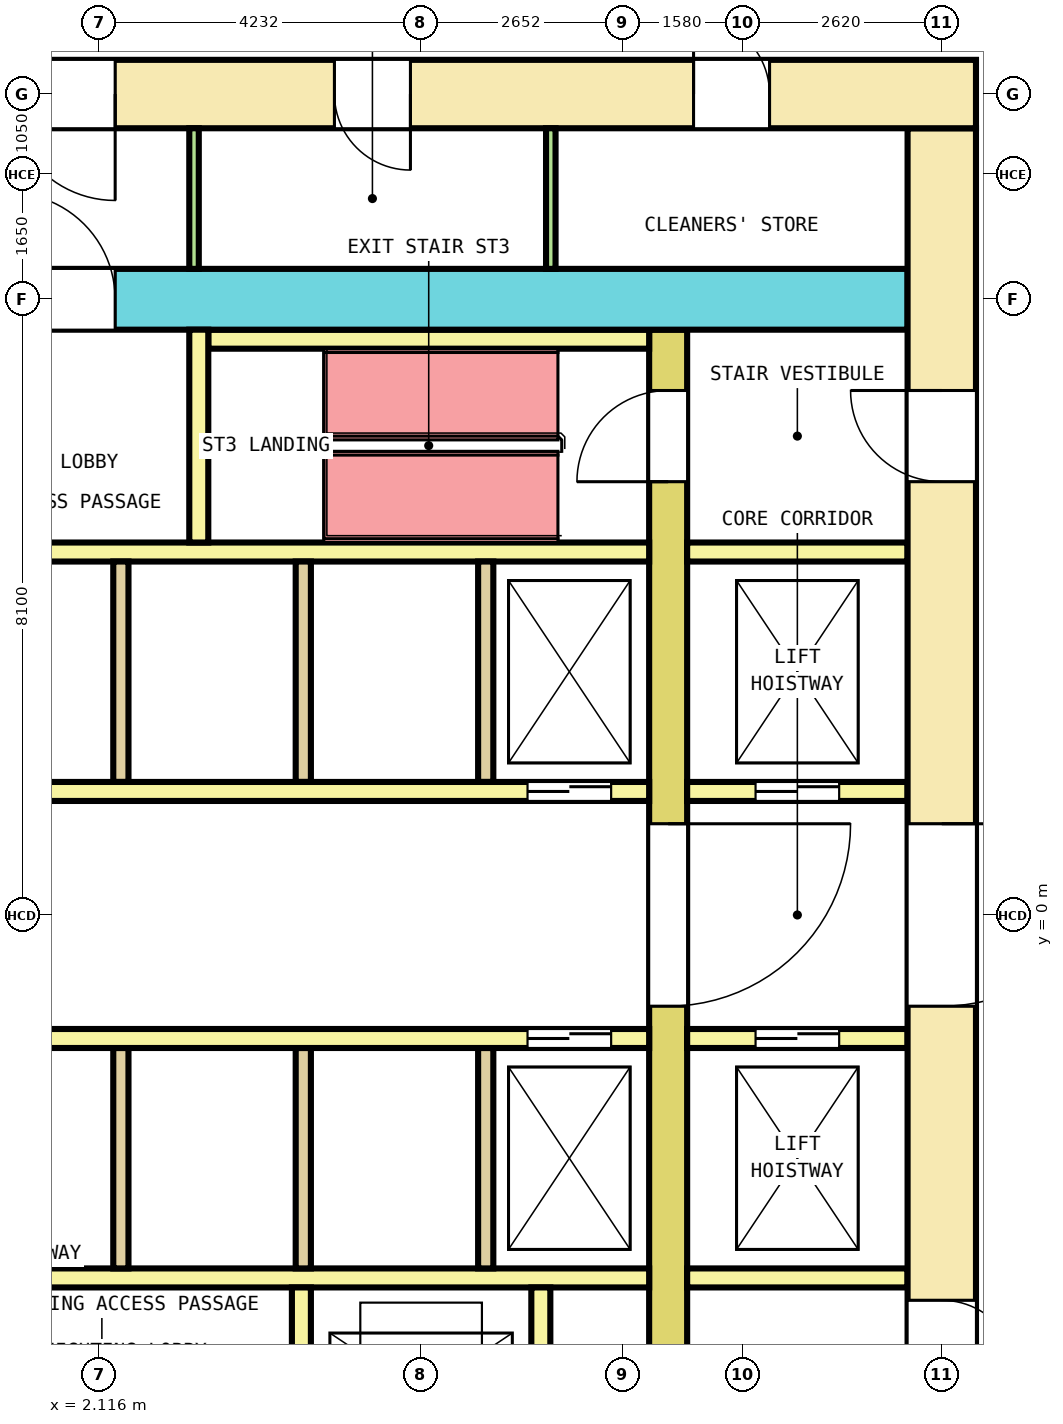
"""IFC4 building model, lengths in metres.
Left out: names, types, materials, properties, quantities, classifications, styles, units other than length and angle.
Written with IfcOpenShell. Run it as: python <this file> out.ifc"""

import sys

from ifc_helpers import new_model, si_unit, direction, frame, frame_2d, origin, place, context, subcontext, project, spatial, rectangle, extrude, element, fill, save


model = new_model("IFC4")
c1 = context("Model", 3, precision=1e-05, world=origin(), true_north=direction((0.0, 1.0)))
c2 = subcontext(c1, "Body", "Model", "MODEL_VIEW")
j1 = project(units=[si_unit("LENGTHUNIT", "METRE"), si_unit("PLANEANGLEUNIT", "RADIAN")], contexts=[c1])
p1 = place(None, origin())
s1 = spatial("IfcSite", under=j1, at=p1, CompositionType="ELEMENT")
p2 = place(p1, origin())
s2 = spatial("IfcBuilding", under=s1, at=p2, CompositionType="ELEMENT")
p3 = place(p2, frame((0.0, 0.0, 32.2)))
s3 = spatial("IfcBuildingStorey", under=s2, at=p3, CompositionType="ELEMENT", Elevation=32.2)
p4 = place(p3, frame((-13.65, 10.8, 0.0), z_axis=(0.0, 0.0, 1.0), x_axis=(1.0, 0.0, 0.0)))
e1 = element("IfcWall", 1, at=p4, inside=s3, PredefinedType="SHEAR", context=c2, shape_type="SweptSolid", body=[
    extrude(rectangle(XDim=27.3, YDim=0.9, at=frame_2d((13.65, 0.0))), origin(), (0.0, 0.0, 1.0), 4.1),
])
p5 = place(p4, frame((2.4, 0.0, 0.0)))
e2 = element("IfcOpeningElement", 2, at=p5, cuts=e1, PredefinedType="OPENING", context=c2, shape_type="SweptSolid", body=[
    extrude(rectangle(XDim=1.0, YDim=2.1, at=frame_2d((0.5, 1.05))), frame((0.0, 0.46, 0.0), z_axis=(0.0, -1.0, 0.0), x_axis=(1.0, 0.0, 0.0)), (0.0, 0.0, 1.0), 0.92),
])
p6 = place(p4, frame((6.494, 0.0, 0.0)))
e3 = element("IfcOpeningElement", 3, at=p6, cuts=e1, PredefinedType="OPENING", context=c2, shape_type="SweptSolid", body=[
    extrude(rectangle(XDim=1.0, YDim=2.1, at=frame_2d((0.5, 1.05))), frame((0.0, 0.46, 0.0), z_axis=(0.0, -1.0, 0.0), x_axis=(1.0, 0.0, 0.0)), (0.0, 0.0, 1.0), 0.92),
])
p7 = place(p4, frame((10.556, 0.0, 0.0)))
e4 = element("IfcOpeningElement", 4, at=p7, cuts=e1, PredefinedType="OPENING", context=c2, shape_type="SweptSolid", body=[
    extrude(rectangle(XDim=1.0, YDim=2.1, at=frame_2d((0.5, 1.05))), frame((0.0, 0.46, 0.0), z_axis=(0.0, -1.0, 0.0), x_axis=(1.0, 0.0, 0.0)), (0.0, 0.0, 1.0), 0.92),
])
p8 = place(p4, frame((18.859, 0.0, 0.0)))
e5 = element("IfcOpeningElement", 5, at=p8, cuts=e1, PredefinedType="OPENING", context=c2, shape_type="SweptSolid", body=[
    extrude(rectangle(XDim=1.0, YDim=2.1, at=frame_2d((0.5, 1.05))), frame((0.0, 0.46, 0.0), z_axis=(0.0, -1.0, 0.0), x_axis=(1.0, 0.0, 0.0)), (0.0, 0.0, 1.0), 0.92),
])
p9 = place(p4, frame((23.584, 0.0, 0.0)))
e6 = element("IfcOpeningElement", 6, at=p9, cuts=e1, PredefinedType="OPENING", context=c2, shape_type="SweptSolid", body=[
    extrude(rectangle(XDim=1.0, YDim=2.1, at=frame_2d((0.5, 1.05))), frame((0.0, 0.46, 0.0), z_axis=(0.0, -1.0, 0.0), x_axis=(1.0, 0.0, 0.0)), (0.0, 0.0, 1.0), 0.92),
])
p10 = place(p4, frame((14.575, 0.0, 0.0)))
e7 = element("IfcOpeningElement", 7, at=p10, cuts=e1, PredefinedType="OPENING", context=c2, shape_type="SweptSolid", body=[
    extrude(rectangle(XDim=1.4, YDim=2.1, at=frame_2d((0.7, 1.05))), frame((0.0, 0.46, 0.0), z_axis=(0.0, -1.0, 0.0), x_axis=(1.0, 0.0, 0.0)), (0.0, 0.0, 1.0), 0.92),
])
p11 = place(p3, frame((13.2, -10.35, 0.0), z_axis=(0.0, 0.0, 1.0), x_axis=(0.0, 1.0, 0.0)))
e8 = element("IfcWall", 8, at=p11, inside=s3, PredefinedType="SHEAR", context=c2, shape_type="SweptSolid", body=[
    extrude(rectangle(XDim=20.7, YDim=0.9, at=frame_2d((10.35, 0.0))), origin(), (0.0, 0.0, 1.0), 4.1),
])
p12 = place(p11, frame((9.15, 0.0, 0.0)))
e9 = element("IfcOpeningElement", 9, at=p12, cuts=e8, PredefinedType="OPENING", context=c2, shape_type="SweptSolid", body=[
    extrude(rectangle(XDim=2.4, YDim=2.1, at=frame_2d((1.2, 1.05))), frame((0.0, 0.46, 0.0), z_axis=(0.0, -1.0, 0.0), x_axis=(1.0, 0.0, 0.0)), (0.0, 0.0, 1.0), 0.92),
])
p13 = place(p11, frame((16.05, 0.0, 0.0)))
e10 = element("IfcOpeningElement", 10, at=p13, cuts=e8, PredefinedType="OPENING", context=c2, shape_type="SweptSolid", body=[
    extrude(rectangle(XDim=1.2, YDim=2.1, at=frame_2d((0.6, 1.05))), frame((0.0, 0.46, 0.0), z_axis=(0.0, -1.0, 0.0), x_axis=(1.0, 0.0, 0.0)), (0.0, 0.0, 1.0), 0.92),
])
p14 = place(p11, frame((2.819, 0.0, 0.0)))
e11 = element("IfcOpeningElement", 11, at=p14, cuts=e8, PredefinedType="OPENING", context=c2, shape_type="SweptSolid", body=[
    extrude(rectangle(XDim=1.0, YDim=2.1, at=frame_2d((0.5, 1.05))), frame((0.0, 0.46, 0.0), z_axis=(0.0, -1.0, 0.0), x_axis=(1.0, 0.0, 0.0)), (0.0, 0.0, 1.0), 0.92),
])
p15 = place(p11, frame((4.281, 0.0, 0.0)))
e12 = element("IfcOpeningElement", 12, at=p15, cuts=e8, PredefinedType="OPENING", context=c2, shape_type="SweptSolid", body=[
    extrude(rectangle(XDim=1.0, YDim=2.1, at=frame_2d((0.5, 1.05))), frame((0.0, 0.46, 0.0), z_axis=(0.0, -1.0, 0.0), x_axis=(1.0, 0.0, 0.0)), (0.0, 0.0, 1.0), 0.92),
])
p16 = place(p3, frame((-12.75, 8.1, 0.0), z_axis=(0.0, 0.0, 1.0), x_axis=(1.0, 0.0, 0.0)))
e13 = element("IfcWall", 13, at=p16, inside=s3, PredefinedType="SHEAR", context=c2, shape_type="SweptSolid", body=[
    extrude(rectangle(XDim=25.5, YDim=0.8, at=frame_2d((12.75, 0.0))), origin(), (0.0, 0.0, 1.0), 4.1),
])
p17 = place(p16, frame((13.675, 0.0, 0.0)))
e14 = element("IfcOpeningElement", 14, at=p17, cuts=e13, PredefinedType="OPENING", context=c2, shape_type="SweptSolid", body=[
    extrude(rectangle(XDim=1.4, YDim=2.1, at=frame_2d((0.7, 1.05))), frame((0.0, 0.41, 0.0), z_axis=(0.0, -1.0, 0.0), x_axis=(1.0, 0.0, 0.0)), (0.0, 0.0, 1.0), 0.82),
])
p18 = place(p3, frame((9.6, -7.7, 0.0), z_axis=(0.0, 0.0, 1.0), x_axis=(0.0, 1.0, 0.0)))
e15 = element("IfcWall", 15, at=p18, inside=s3, PredefinedType="SHEAR", context=c2, shape_type="SweptSolid", body=[
    extrude(rectangle(XDim=15.4, YDim=0.5, at=frame_2d((7.7, 0.0))), origin(), (0.0, 0.0, 1.0), 4.1),
])
p19 = place(p18, frame((6.5, 0.0, 0.0)))
e16 = element("IfcOpeningElement", 16, at=p19, cuts=e15, PredefinedType="OPENING", context=c2, shape_type="SweptSolid", body=[
    extrude(rectangle(XDim=2.4, YDim=2.1, at=frame_2d((1.2, 1.05))), frame((0.0, 0.26, 0.0), z_axis=(0.0, -1.0, 0.0), x_axis=(1.0, 0.0, 0.0)), (0.0, 0.0, 1.0), 0.52),
])
p20 = place(p18, frame((13.4, 0.0, 0.0)))
e17 = element("IfcOpeningElement", 17, at=p20, cuts=e15, PredefinedType="OPENING", context=c2, shape_type="SweptSolid", body=[
    extrude(rectangle(XDim=1.2, YDim=2.1, at=frame_2d((0.6, 1.05))), frame((0.0, 0.26, 0.0), z_axis=(0.0, -1.0, 0.0), x_axis=(1.0, 0.0, 0.0)), (0.0, 0.0, 1.0), 0.52),
])
p21 = place(p18, frame((0.9, 0.0, 0.0)))
e18 = element("IfcOpeningElement", 18, at=p21, cuts=e15, PredefinedType="OPENING", context=c2, shape_type="SweptSolid", body=[
    extrude(rectangle(XDim=1.0, YDim=2.1, at=frame_2d((0.5, 1.05))), frame((0.0, 0.26, 0.0), z_axis=(0.0, -1.0, 0.0), x_axis=(1.0, 0.0, 0.0)), (0.0, 0.0, 1.0), 0.52),
])
p22 = place(p3, frame((-9.35, 1.625, 0.0), z_axis=(0.0, 0.0, 1.0), x_axis=(1.0, 0.0, 0.0)))
e19 = element("IfcWall", 19, at=p22, inside=s3, PredefinedType="SOLIDWALL", context=c2, shape_type="SweptSolid", body=[
    extrude(rectangle(XDim=18.7, YDim=0.25, at=frame_2d((9.35, 0.0))), origin(), (0.0, 0.0, 1.0), 4.1),
])
p23 = place(p22, frame((0.5, 0.0, 0.0)))
e20 = element("IfcOpeningElement", 20, at=p23, cuts=e19, PredefinedType="OPENING", context=c2, shape_type="SweptSolid", body=[
    extrude(rectangle(XDim=1.1, YDim=2.1, at=frame_2d((0.55, 1.05))), frame((0.0, 0.135, 0.0), z_axis=(0.0, -1.0, 0.0), x_axis=(1.0, 0.0, 0.0)), (0.0, 0.0, 1.0), 0.27),
])
p24 = place(p22, frame((17.1, 0.0, 0.0)))
e21 = element("IfcOpeningElement", 21, at=p24, cuts=e19, PredefinedType="OPENING", context=c2, shape_type="SweptSolid", body=[
    extrude(rectangle(XDim=1.1, YDim=2.1, at=frame_2d((0.55, 1.05))), frame((0.0, 0.135, 0.0), z_axis=(0.0, -1.0, 0.0), x_axis=(1.0, 0.0, 0.0)), (0.0, 0.0, 1.0), 0.27),
])
p25 = place(p3, frame((9.85, 1.625, 0.0), z_axis=(0.0, 0.0, 1.0), x_axis=(1.0, 0.0, 0.0)))
e22 = element("IfcWall", 22, at=p25, inside=s3, PredefinedType="SOLIDWALL", context=c2, shape_type="SweptSolid", body=[
    extrude(rectangle(XDim=2.9, YDim=0.25, at=frame_2d((1.45, 0.0))), origin(), (0.0, 0.0, 1.0), 4.1),
])
p26 = place(p25, frame((0.9, 0.0, 0.0)))
e23 = element("IfcOpeningElement", 23, at=p26, cuts=e22, PredefinedType="OPENING", context=c2, shape_type="SweptSolid", body=[
    extrude(rectangle(XDim=1.1, YDim=2.1, at=frame_2d((0.55, 1.05))), frame((0.0, 0.135, 0.0), z_axis=(0.0, -1.0, 0.0), x_axis=(1.0, 0.0, 0.0)), (0.0, 0.0, 1.0), 0.27),
])
p27 = place(p3, frame((-9.35, 4.775, 0.0), z_axis=(0.0, 0.0, 1.0), x_axis=(1.0, 0.0, 0.0)))
e24 = element("IfcWall", 24, at=p27, inside=s3, PredefinedType="SOLIDWALL", context=c2, shape_type="SweptSolid", body=[
    extrude(rectangle(XDim=18.7, YDim=0.25, at=frame_2d((9.35, 0.0))), origin(), (0.0, 0.0, 1.0), 4.1),
])
p28 = place(p3, frame((9.85, 4.775, 0.0), z_axis=(0.0, 0.0, 1.0), x_axis=(1.0, 0.0, 0.0)))
e25 = element("IfcWall", 25, at=p28, inside=s3, PredefinedType="SOLIDWALL", context=c2, shape_type="SweptSolid", body=[
    extrude(rectangle(XDim=2.9, YDim=0.25, at=frame_2d((1.45, 0.0))), origin(), (0.0, 0.0, 1.0), 4.1),
])
for number, where, z_axis, x_axis in (
    (26, (2.4, 1.75, 0.0), (0.0, 0.0, 1.0), (0.0, 1.0, 0.0)),
    (27, (4.8, 1.75, 0.0), (0.0, 0.0, 1.0), (0.0, 1.0, 0.0)),
    (28, (7.2, 1.75, 0.0), (0.0, 0.0, 1.0), (0.0, 1.0, 0.0)),
):
    element("IfcWall", number, at=place(p3, frame(where, z_axis=z_axis, x_axis=x_axis)), inside=s3, PredefinedType="SOLIDWALL", context=c2, shape_type="SweptSolid", body=[
        extrude(rectangle(XDim=2.9, YDim=0.2, at=frame_2d((1.45, 0.0))), origin(), (0.0, 0.0, 1.0), 4.1),
    ])
p29 = place(p3, frame((-9.35, -1.625, 0.0), z_axis=(0.0, 0.0, 1.0), x_axis=(1.0, 0.0, 0.0)))
e29 = element("IfcWall", 29, at=p29, inside=s3, PredefinedType="SOLIDWALL", context=c2, shape_type="SweptSolid", body=[
    extrude(rectangle(XDim=18.7, YDim=0.25, at=frame_2d((9.35, 0.0))), origin(), (0.0, 0.0, 1.0), 4.1),
])
p30 = place(p29, frame((0.5, 0.0, 0.0)))
e30 = element("IfcOpeningElement", 30, at=p30, cuts=e29, PredefinedType="OPENING", context=c2, shape_type="SweptSolid", body=[
    extrude(rectangle(XDim=1.1, YDim=2.1, at=frame_2d((0.55, 1.05))), frame((0.0, 0.135, 0.0), z_axis=(0.0, -1.0, 0.0), x_axis=(1.0, 0.0, 0.0)), (0.0, 0.0, 1.0), 0.27),
])
p31 = place(p29, frame((17.1, 0.0, 0.0)))
e31 = element("IfcOpeningElement", 31, at=p31, cuts=e29, PredefinedType="OPENING", context=c2, shape_type="SweptSolid", body=[
    extrude(rectangle(XDim=1.1, YDim=2.1, at=frame_2d((0.55, 1.05))), frame((0.0, 0.135, 0.0), z_axis=(0.0, -1.0, 0.0), x_axis=(1.0, 0.0, 0.0)), (0.0, 0.0, 1.0), 0.27),
])
p32 = place(p3, frame((9.85, -1.625, 0.0), z_axis=(0.0, 0.0, 1.0), x_axis=(1.0, 0.0, 0.0)))
e32 = element("IfcWall", 32, at=p32, inside=s3, PredefinedType="SOLIDWALL", context=c2, shape_type="SweptSolid", body=[
    extrude(rectangle(XDim=2.9, YDim=0.25, at=frame_2d((1.45, 0.0))), origin(), (0.0, 0.0, 1.0), 4.1),
])
p33 = place(p32, frame((0.9, 0.0, 0.0)))
e33 = element("IfcOpeningElement", 33, at=p33, cuts=e32, PredefinedType="OPENING", context=c2, shape_type="SweptSolid", body=[
    extrude(rectangle(XDim=1.1, YDim=2.1, at=frame_2d((0.55, 1.05))), frame((0.0, 0.135, 0.0), z_axis=(0.0, -1.0, 0.0), x_axis=(1.0, 0.0, 0.0)), (0.0, 0.0, 1.0), 0.27),
])
p34 = place(p3, frame((-9.35, -4.775, 0.0), z_axis=(0.0, 0.0, 1.0), x_axis=(1.0, 0.0, 0.0)))
e34 = element("IfcWall", 34, at=p34, inside=s3, PredefinedType="SOLIDWALL", context=c2, shape_type="SweptSolid", body=[
    extrude(rectangle(XDim=18.7, YDim=0.25, at=frame_2d((9.35, 0.0))), origin(), (0.0, 0.0, 1.0), 4.1),
])
p35 = place(p3, frame((9.85, -4.775, 0.0), z_axis=(0.0, 0.0, 1.0), x_axis=(1.0, 0.0, 0.0)))
e35 = element("IfcWall", 35, at=p35, inside=s3, PredefinedType="SOLIDWALL", context=c2, shape_type="SweptSolid", body=[
    extrude(rectangle(XDim=2.9, YDim=0.25, at=frame_2d((1.45, 0.0))), origin(), (0.0, 0.0, 1.0), 4.1),
])
for number, where, z_axis, x_axis in (
    (36, (2.4, -4.65, 0.0), (0.0, 0.0, 1.0), (0.0, 1.0, 0.0)),
    (37, (4.8, -4.65, 0.0), (0.0, 0.0, 1.0), (0.0, 1.0, 0.0)),
    (38, (7.2, -4.65, 0.0), (0.0, 0.0, 1.0), (0.0, 1.0, 0.0)),
):
    element("IfcWall", number, at=place(p3, frame(where, z_axis=z_axis, x_axis=x_axis)), inside=s3, PredefinedType="SOLIDWALL", context=c2, shape_type="SweptSolid", body=[
        extrude(rectangle(XDim=2.9, YDim=0.2, at=frame_2d((1.45, 0.0))), origin(), (0.0, 0.0, 1.0), 4.1),
    ])
p36 = place(p3, frame((3.55, 7.575, 0.0), z_axis=(0.0, 0.0, 1.0), x_axis=(1.0, 0.0, 0.0)))
e39 = element("IfcWall", 39, at=p36, inside=s3, PredefinedType="SOLIDWALL", context=c2, shape_type="SweptSolid", body=[
    extrude(rectangle(XDim=5.8, YDim=0.25, at=frame_2d((2.9, 0.0))), origin(), (0.0, 0.0, 1.0), 4.1),
])
p37 = place(p3, frame((3.425, 4.9, 0.0), z_axis=(0.0, 0.0, 1.0), x_axis=(0.0, 1.0, 0.0)))
e40 = element("IfcWall", 40, at=p37, inside=s3, PredefinedType="SOLIDWALL", context=c2, shape_type="SweptSolid", body=[
    extrude(rectangle(XDim=2.8, YDim=0.25, at=frame_2d((1.4, 0.0))), origin(), (0.0, 0.0, 1.0), 4.1),
])
p38 = place(p3, frame((4.775, -7.7, 0.0), z_axis=(0.0, 0.0, 1.0), x_axis=(0.0, 1.0, 0.0)))
e41 = element("IfcWall", 41, at=p38, inside=s3, PredefinedType="SOLIDWALL", context=c2, shape_type="SweptSolid", body=[
    extrude(rectangle(XDim=2.8, YDim=0.25, at=frame_2d((1.4, 0.0))), origin(), (0.0, 0.0, 1.0), 4.1),
])
p39 = place(p38, frame((0.85, 0.0, 0.0)))
e42 = element("IfcOpeningElement", 42, at=p39, cuts=e41, PredefinedType="OPENING", context=c2, shape_type="SweptSolid", body=[
    extrude(rectangle(XDim=1.1, YDim=2.1, at=frame_2d((0.55, 1.05))), frame((0.0, 0.135, 0.0), z_axis=(0.0, -1.0, 0.0), x_axis=(1.0, 0.0, 0.0)), (0.0, 0.0, 1.0), 0.27),
])
p40 = place(p3, frame((7.925, -7.7, 0.0), z_axis=(0.0, 0.0, 1.0), x_axis=(0.0, 1.0, 0.0)))
e43 = element("IfcWall", 43, at=p40, inside=s3, PredefinedType="SOLIDWALL", context=c2, shape_type="SweptSolid", body=[
    extrude(rectangle(XDim=2.8, YDim=0.25, at=frame_2d((1.4, 0.0))), origin(), (0.0, 0.0, 1.0), 4.1),
])
for number, where, z_axis, x_axis in (
    (44, (3.363, 8.5, 0.0), (0.0, 0.0, 1.0), (0.0, 1.0, 0.0)),
    (45, (8.056, 8.5, 0.0), (0.0, 0.0, 1.0), (0.0, 1.0, 0.0)),
):
    element("IfcWall", number, at=place(p3, frame(where, z_axis=z_axis, x_axis=x_axis)), inside=s3, PredefinedType="PARTITIONING", context=c2, shape_type="SweptSolid", body=[
        extrude(rectangle(XDim=1.85, YDim=0.125, at=frame_2d((0.925, 0.0))), origin(), (0.0, 0.0, 1.0), 4.1),
    ])
p41 = place(p24, origin())
e46 = element("IfcDoor", 46, at=p41, inside=s3, OperationType="DOUBLE_DOOR_SLIDING", PredefinedType="DOOR", context=c2, shape_type="SweptSolid", body=[
    extrude(rectangle(XDim=1.1, YDim=2.1, at=frame_2d((0.55, 1.05))), frame((0.0, 0.075, 0.0), z_axis=(0.0, -1.0, 0.0), x_axis=(1.0, 0.0, 0.0)), (0.0, 0.0, 1.0), 0.15),
])
fill(e21, e46)
p42 = place(p26, origin())
e47 = element("IfcDoor", 47, at=p42, inside=s3, OperationType="DOUBLE_DOOR_SLIDING", PredefinedType="DOOR", context=c2, shape_type="SweptSolid", body=[
    extrude(rectangle(XDim=1.1, YDim=2.1, at=frame_2d((0.55, 1.05))), frame((0.0, 0.075, 0.0), z_axis=(0.0, -1.0, 0.0), x_axis=(1.0, 0.0, 0.0)), (0.0, 0.0, 1.0), 0.15),
])
fill(e23, e47)
p43 = place(p31, origin())
e48 = element("IfcDoor", 48, at=p43, inside=s3, OperationType="DOUBLE_DOOR_SLIDING", PredefinedType="DOOR", context=c2, shape_type="SweptSolid", body=[
    extrude(rectangle(XDim=1.1, YDim=2.1, at=frame_2d((0.55, 1.05))), frame((0.0, 0.075, 0.0), z_axis=(0.0, -1.0, 0.0), x_axis=(1.0, 0.0, 0.0)), (0.0, 0.0, 1.0), 0.15),
])
fill(e31, e48)
p44 = place(p33, origin())
e49 = element("IfcDoor", 49, at=p44, inside=s3, OperationType="DOUBLE_DOOR_SLIDING", PredefinedType="DOOR", context=c2, shape_type="SweptSolid", body=[
    extrude(rectangle(XDim=1.1, YDim=2.1, at=frame_2d((0.55, 1.05))), frame((0.0, 0.075, 0.0), z_axis=(0.0, -1.0, 0.0), x_axis=(1.0, 0.0, 0.0)), (0.0, 0.0, 1.0), 0.15),
])
fill(e33, e49)
p45 = place(p19, origin())
e50 = element("IfcDoor", 50, at=p45, inside=s3, OperationType="DOUBLE_DOOR_SINGLE_SWING", PredefinedType="DOOR", context=c2, shape_type="SweptSolid", body=[
    extrude(rectangle(XDim=2.4, YDim=2.1, at=frame_2d((1.2, 1.05))), frame((0.0, 0.2, 0.0), z_axis=(0.0, -1.0, 0.0), x_axis=(1.0, 0.0, 0.0)), (0.0, 0.0, 1.0), 0.4),
])
fill(e16, e50)
p46 = place(p12, origin())
e51 = element("IfcDoor", 51, at=p46, inside=s3, OperationType="DOUBLE_DOOR_SINGLE_SWING", PredefinedType="DOOR", context=c2, shape_type="SweptSolid", body=[
    extrude(rectangle(XDim=2.4, YDim=2.1, at=frame_2d((1.2, 1.05))), frame((0.0, 0.3, 0.0), z_axis=(0.0, -1.0, 0.0), x_axis=(1.0, 0.0, 0.0)), (0.0, 0.0, 1.0), 0.6),
])
fill(e9, e51)
p47 = place(p20, origin())
e52 = element("IfcDoor", 52, at=p47, inside=s3, OperationType="SINGLE_SWING_RIGHT", PredefinedType="DOOR", context=c2, shape_type="SweptSolid", body=[
    extrude(rectangle(XDim=1.2, YDim=2.1, at=frame_2d((0.6, 1.05))), frame((0.0, 0.2, 0.0), z_axis=(0.0, -1.0, 0.0), x_axis=(1.0, 0.0, 0.0)), (0.0, 0.0, 1.0), 0.4),
])
fill(e17, e52)
p48 = place(p13, origin())
e53 = element("IfcDoor", 53, at=p48, inside=s3, OperationType="SINGLE_SWING_LEFT", PredefinedType="DOOR", context=c2, shape_type="SweptSolid", body=[
    extrude(rectangle(XDim=1.2, YDim=2.1, at=frame_2d((0.6, 1.05))), frame((0.0, 0.3, 0.0), z_axis=(0.0, -1.0, 0.0), x_axis=(1.0, 0.0, 0.0)), (0.0, 0.0, 1.0), 0.6),
])
fill(e10, e53)
p49 = place(p17, origin())
e54 = element("IfcDoor", 54, at=p49, inside=s3, OperationType="DOUBLE_DOOR_SINGLE_SWING", PredefinedType="DOOR", context=c2, shape_type="SweptSolid", body=[
    extrude(rectangle(XDim=1.4, YDim=2.1, at=frame_2d((0.7, 1.05))), frame((0.0, 0.3, 0.0), z_axis=(0.0, -1.0, 0.0), x_axis=(1.0, 0.0, 0.0)), (0.0, 0.0, 1.0), 0.6),
])
fill(e14, e54)
p50 = place(p15, origin())
e55 = element("IfcDoor", 55, at=p50, inside=s3, OperationType="SINGLE_SWING_RIGHT", PredefinedType="DOOR", context=c2, shape_type="SweptSolid", body=[
    extrude(rectangle(XDim=1.0, YDim=2.1, at=frame_2d((0.5, 1.05))), frame((0.0, 0.3, 0.0), z_axis=(0.0, -1.0, 0.0), x_axis=(1.0, 0.0, 0.0)), (0.0, 0.0, 1.0), 0.6),
])
fill(e12, e55)
p51 = place(p8, origin())
e56 = element("IfcDoor", 56, at=p51, inside=s3, OperationType="SINGLE_SWING_RIGHT", PredefinedType="DOOR", context=c2, shape_type="SweptSolid", body=[
    extrude(rectangle(XDim=1.0, YDim=2.1, at=frame_2d((0.5, 1.05))), frame((0.0, 0.3, 0.0), z_axis=(0.0, -1.0, 0.0), x_axis=(1.0, 0.0, 0.0)), (0.0, 0.0, 1.0), 0.6),
])
fill(e5, e56)
p52 = place(p9, origin())
e57 = element("IfcDoor", 57, at=p52, inside=s3, OperationType="SINGLE_SWING_LEFT", PredefinedType="DOOR", context=c2, shape_type="SweptSolid", body=[
    extrude(rectangle(XDim=1.0, YDim=2.1, at=frame_2d((0.5, 1.05))), frame((0.0, 0.3, 0.0), z_axis=(0.0, -1.0, 0.0), x_axis=(1.0, 0.0, 0.0)), (0.0, 0.0, 1.0), 0.6),
])
fill(e6, e57)
p53 = place(p10, origin())
e58 = element("IfcDoor", 58, at=p53, inside=s3, OperationType="DOUBLE_DOOR_SINGLE_SWING", PredefinedType="DOOR", context=c2, shape_type="SweptSolid", body=[
    extrude(rectangle(XDim=1.4, YDim=2.1, at=frame_2d((0.7, 1.05))), frame((0.0, 0.3, 0.0), z_axis=(0.0, -1.0, 0.0), x_axis=(1.0, 0.0, 0.0)), (0.0, 0.0, 1.0), 0.6),
])
fill(e7, e58)
save(model, sys.argv[1])
